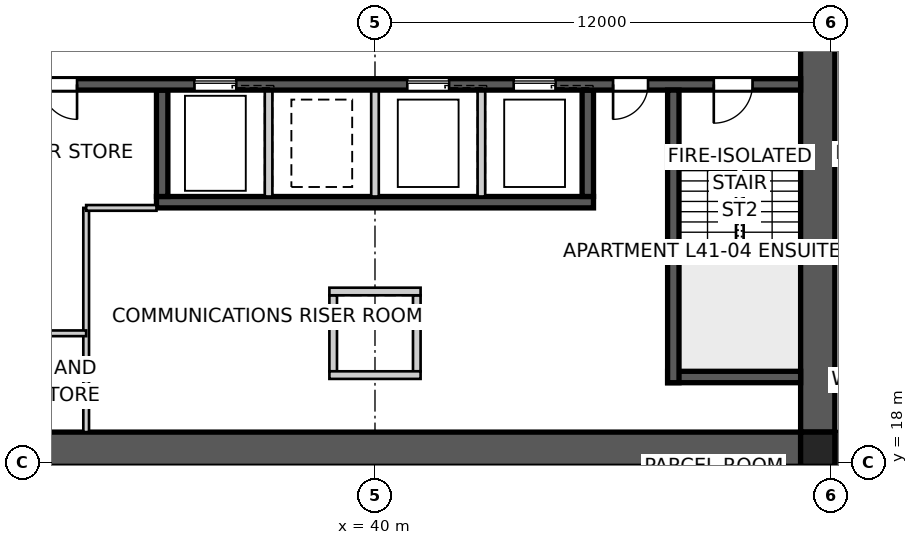
"""IFC4 building model, lengths in metres.
Left out: names, types, materials, properties, quantities, classifications, styles, units other than length and angle.
Written with IfcOpenShell. Run it as: python <this file> out.ifc"""

import sys

from ifc_helpers import new_model, si_unit, direction, frame, frame_2d, origin, origin_2d, place, context, subcontext, project, spatial, polyline, rectangle, outline, extrude, element, fill, save


model = new_model("IFC4")
c1 = context("Model", 3, precision=1e-05, world=origin(), true_north=direction((0.0, 1.0)))
c2 = subcontext(c1, "Body", "Model", "MODEL_VIEW")
j1 = project(units=[si_unit("LENGTHUNIT", "METRE"), si_unit("PLANEANGLEUNIT", "RADIAN")], contexts=[c1])
p1 = place(None, origin())
s1 = spatial("IfcSite", under=j1, at=p1, CompositionType="ELEMENT")
p2 = place(p1, origin())
s2 = spatial("IfcBuilding", under=s1, at=p2, CompositionType="ELEMENT")
p3 = place(p2, frame((0.0, 0.0, 150.6)))
s3 = spatial("IfcBuildingStorey", under=s2, at=p3, CompositionType="ELEMENT", Elevation=150.6)
p4 = place(p3, frame((51.2, 18.35, 0.0), z_axis=(0.0, 0.0, 1.0), x_axis=(-1.0, 0.0, 0.0)))
e1 = element("IfcWall", 1, at=p4, inside=s3, PredefinedType="SHEAR", context=c2, shape_type="SweptSolid", body=[
    extrude(outline(polyline([(0.0, -0.45), (22.4, -0.45), (22.4, -0.025), (22.85, -0.025), (22.85, 0.025), (22.4, 0.025), (22.4, 0.45), (0.0, 0.45), (0.0, 0.025), (-0.45, 0.025), (-0.45, -0.025), (0.0, -0.025), (0.0, -0.45)])), origin(), (0.0, 0.0, 1.0), 3.4),
])
p5 = place(p3, frame((51.65, 18.8, 0.0), z_axis=(0.0, 0.0, 1.0), x_axis=(0.0, 1.0, 0.0)))
e2 = element("IfcWall", 2, at=p5, inside=s3, PredefinedType="SHEAR", context=c2, shape_type="SweptSolid", body=[
    extrude(outline(polyline([(0.0, -0.45), (22.4, -0.45), (22.4, -0.025), (22.85, -0.025), (22.85, 0.025), (22.4, 0.025), (22.4, 0.45), (0.0, 0.45), (0.0, 0.025), (-0.45, 0.025), (-0.45, -0.025), (0.0, -0.025), (0.0, -0.45)])), origin(), (0.0, 0.0, 1.0), 3.4),
])
p6 = place(p5, frame((11.14, 0.0, 0.0)))
e3 = element("IfcOpeningElement", 3, at=p6, cuts=e2, PredefinedType="OPENING", context=c2, shape_type="SweptSolid", body=[
    extrude(rectangle(XDim=1.02, YDim=2.4, at=frame_2d((0.51, 1.2))), frame((0.0, 0.46, 0.0), z_axis=(0.0, -1.0, 0.0), x_axis=(1.0, 0.0, 0.0)), (0.0, 0.0, 1.0), 0.92),
])
p7 = place(p3, frame((51.2, 27.95, 0.0), z_axis=(0.0, 0.0, 1.0), x_axis=(-1.0, 0.0, 0.0)))
e4 = element("IfcWall", 4, at=p7, inside=s3, PredefinedType="SHEAR", context=c2, shape_type="SweptSolid", body=[
    extrude(rectangle(XDim=22.4, YDim=0.3, at=frame_2d((11.2, 0.0))), origin(), (0.0, 0.0, 1.0), 3.4),
])
p8 = place(p7, frame((19.04, 0.0, 0.0)))
e5 = element("IfcOpeningElement", 5, at=p8, cuts=e4, PredefinedType="OPENING", context=c2, shape_type="SweptSolid", body=[
    extrude(rectangle(XDim=0.92, YDim=2.1, at=frame_2d((0.46, 1.05))), frame((0.0, 0.16, 0.0), z_axis=(0.0, -1.0, 0.0), x_axis=(1.0, 0.0, 0.0)), (0.0, 0.0, 1.0), 0.32),
])
p9 = place(p7, frame((1.265, 0.0, 0.0)))
e6 = element("IfcOpeningElement", 6, at=p9, cuts=e4, PredefinedType="OPENING", context=c2, shape_type="SweptSolid", body=[
    extrude(rectangle(XDim=1.02, YDim=2.1, at=frame_2d((0.51, 1.05))), frame((0.0, 0.16, 0.0), z_axis=(0.0, -1.0, 0.0), x_axis=(1.0, 0.0, 0.0)), (0.0, 0.0, 1.0), 0.32),
])
p10 = place(p7, frame((4.015, 0.0, 0.0)))
e7 = element("IfcOpeningElement", 7, at=p10, cuts=e4, PredefinedType="OPENING", context=c2, shape_type="SweptSolid", body=[
    extrude(rectangle(XDim=0.92, YDim=2.1, at=frame_2d((0.46, 1.05))), frame((0.0, 0.16, 0.0), z_axis=(0.0, -1.0, 0.0), x_axis=(1.0, 0.0, 0.0)), (0.0, 0.0, 1.0), 0.32),
])
p11 = place(p7, frame((6.45, 0.0, 0.0)))
e8 = element("IfcOpeningElement", 8, at=p11, cuts=e4, PredefinedType="OPENING", context=c2, shape_type="SweptSolid", body=[
    extrude(rectangle(XDim=1.1, YDim=2.1, at=frame_2d((0.55, 1.05))), frame((0.0, 0.16, 0.0), z_axis=(0.0, -1.0, 0.0), x_axis=(1.0, 0.0, 0.0)), (0.0, 0.0, 1.0), 0.32),
])
p12 = place(p7, frame((9.25, 0.0, 0.0)))
e9 = element("IfcOpeningElement", 9, at=p12, cuts=e4, PredefinedType="OPENING", context=c2, shape_type="SweptSolid", body=[
    extrude(rectangle(XDim=1.1, YDim=2.1, at=frame_2d((0.55, 1.05))), frame((0.0, 0.16, 0.0), z_axis=(0.0, -1.0, 0.0), x_axis=(1.0, 0.0, 0.0)), (0.0, 0.0, 1.0), 0.32),
])
p13 = place(p7, frame((14.85, 0.0, 0.0)))
e10 = element("IfcOpeningElement", 10, at=p13, cuts=e4, PredefinedType="OPENING", context=c2, shape_type="SweptSolid", body=[
    extrude(rectangle(XDim=1.1, YDim=2.1, at=frame_2d((0.55, 1.05))), frame((0.0, 0.16, 0.0), z_axis=(0.0, -1.0, 0.0), x_axis=(1.0, 0.0, 0.0)), (0.0, 0.0, 1.0), 0.32),
])
p14 = place(p3, frame((45.75, 24.85, 0.0), z_axis=(0.0, 0.0, 1.0), x_axis=(-1.0, 0.0, 0.0)))
e11 = element("IfcWall", 11, at=p14, inside=s3, PredefinedType="SHEAR", context=c2, shape_type="SweptSolid", body=[
    extrude(rectangle(XDim=11.5, YDim=0.3, at=frame_2d((5.75, 0.0))), origin(), (0.0, 0.0, 1.0), 3.4),
])
p15 = place(p3, frame((45.6, 27.8, 0.0), z_axis=(0.0, 0.0, 1.0), x_axis=(0.0, -1.0, 0.0)))
e12 = element("IfcWall", 12, at=p15, inside=s3, PredefinedType="SHEAR", context=c2, shape_type="SweptSolid", body=[
    extrude(rectangle(XDim=2.8, YDim=0.3, at=frame_2d((1.4, 0.0))), origin(), (0.0, 0.0, 1.0), 3.4),
])
for number, where, z_axis, x_axis in (
    (13, (42.8, 27.8, 0.0), (0.0, 0.0, 1.0), (0.0, -1.0, 0.0)),
    (14, (40.0, 27.8, 0.0), (0.0, 0.0, 1.0), (0.0, -1.0, 0.0)),
    (15, (37.2, 27.8, 0.0), (0.0, 0.0, 1.0), (0.0, -1.0, 0.0)),
):
    element("IfcWall", number, at=place(p3, frame(where, z_axis=z_axis, x_axis=x_axis)), inside=s3, PredefinedType="SOLIDWALL", context=c2, shape_type="SweptSolid", body=[
        extrude(rectangle(XDim=2.8, YDim=0.2, at=frame_2d((1.4, 0.0))), origin(), (0.0, 0.0, 1.0), 3.4),
    ])
p16 = place(p3, frame((34.4, 27.8, 0.0), z_axis=(0.0, 0.0, 1.0), x_axis=(0.0, -1.0, 0.0)))
e16 = element("IfcWall", 16, at=p16, inside=s3, PredefinedType="SHEAR", context=c2, shape_type="SweptSolid", body=[
    extrude(rectangle(XDim=2.8, YDim=0.3, at=frame_2d((1.4, 0.0))), origin(), (0.0, 0.0, 1.0), 3.4),
])
p17 = place(p3, frame((47.85, 27.8, 0.0), z_axis=(0.0, 0.0, 1.0), x_axis=(0.0, -1.0, 0.0)))
e17 = element("IfcWall", 17, at=p17, inside=s3, PredefinedType="SHEAR", context=c2, shape_type="SweptSolid", body=[
    extrude(rectangle(XDim=7.7, YDim=0.3, at=frame_2d((3.85, 0.0))), origin(), (0.0, 0.0, 1.0), 3.4),
])
p18 = place(p3, frame((51.2, 20.25, 0.0), z_axis=(0.0, 0.0, 1.0), x_axis=(-1.0, 0.0, 0.0)))
e18 = element("IfcWall", 18, at=p18, inside=s3, PredefinedType="SHEAR", context=c2, shape_type="SweptSolid", body=[
    extrude(rectangle(XDim=3.5, YDim=0.3, at=frame_2d((1.75, 0.0))), origin(), (0.0, 0.0, 1.0), 3.4),
])
for number, where, z_axis, x_axis in (
    (19, (38.9, 22.4, 0.0), (0.0, 0.0, 1.0), (0.0, -1.0, 0.0)),
    (20, (41.1, 22.4, 0.0), (0.0, 0.0, 1.0), (0.0, -1.0, 0.0)),
):
    element("IfcWall", number, at=place(p3, frame(where, z_axis=z_axis, x_axis=x_axis)), inside=s3, PredefinedType="SOLIDWALL", context=c2, shape_type="SweptSolid", body=[
        extrude(rectangle(XDim=2.0, YDim=0.2, at=frame_2d((1.0, 0.0))), origin(), (0.0, 0.0, 1.0), 3.4),
    ])
for number, where, z_axis, x_axis in (
    (21, (38.8, 22.5, 0.0), (0.0, 0.0, 1.0), (1.0, 0.0, 0.0)),
    (22, (38.8, 20.3, 0.0), (0.0, 0.0, 1.0), (1.0, 0.0, 0.0)),
):
    element("IfcWall", number, at=place(p3, frame(where, z_axis=z_axis, x_axis=x_axis)), inside=s3, PredefinedType="SOLIDWALL", context=c2, shape_type="SweptSolid", body=[
        extrude(rectangle(XDim=2.4, YDim=0.2, at=frame_2d((1.2, 0.0))), origin(), (0.0, 0.0, 1.0), 3.4),
    ])
p19 = place(p3, frame((51.65, 18.35, 0.0), z_axis=(0.0, 0.0, 1.0), x_axis=(1.0, 0.0, 0.0)))
e23 = element("IfcColumn", 23, at=p19, inside=s3, PredefinedType="COLUMN", context=c2, shape_type="SweptSolid", body=[
    extrude(rectangle(XDim=0.9, YDim=0.9, at=origin_2d()), origin(), (0.0, 0.0, 1.0), 3.4),
])
p20 = place(p3, frame((32.4, 18.8, 0.0), z_axis=(0.0, 0.0, 1.0), x_axis=(0.0, 1.0, 0.0)))
e24 = element("IfcWall", 24, at=p20, inside=s3, PredefinedType="SOLIDWALL", context=c2, shape_type="SweptSolid", body=[
    extrude(rectangle(XDim=5.9, YDim=0.15, at=frame_2d((2.95, 0.0))), origin(), (0.0, 0.0, 1.0), 3.25),
])
p21 = place(p3, frame((32.4, 24.7, 0.0), z_axis=(0.0, 0.0, 1.0), x_axis=(1.0, 0.0, 0.0)))
e25 = element("IfcWall", 25, at=p21, inside=s3, PredefinedType="SOLIDWALL", context=c2, shape_type="SweptSolid", body=[
    extrude(rectangle(XDim=1.85, YDim=0.15, at=frame_2d((0.925, 0.0))), origin(), (0.0, 0.0, 1.0), 3.25),
])
p22 = place(p3, frame((32.4, 21.4, 0.0), z_axis=(0.0, 0.0, 1.0), x_axis=(-1.0, 0.0, 0.0)))
e26 = element("IfcWall", 26, at=p22, inside=s3, PredefinedType="SOLIDWALL", context=c2, shape_type="SweptSolid", body=[
    extrude(rectangle(XDim=3.6, YDim=0.15, at=frame_2d((1.8, 0.0))), origin(), (0.0, 0.0, 1.0), 3.25),
])
p23 = place(p22, frame((1.34, 0.0, 0.0)))
e27 = element("IfcOpeningElement", 27, at=p23, cuts=e26, PredefinedType="OPENING", context=c2, shape_type="SweptSolid", body=[
    extrude(rectangle(XDim=0.92, YDim=2.1, at=frame_2d((0.46, 1.05))), frame((0.0, 0.085, 0.0), z_axis=(0.0, -1.0, 0.0), x_axis=(1.0, 0.0, 0.0)), (0.0, 0.0, 1.0), 0.17),
])
p24 = place(p3, frame((52.1, 15.65, 0.0), z_axis=(0.0, 0.0, 1.0), x_axis=(0.0, 1.0, 0.0)))
e28 = element("IfcWall", 28, at=p24, inside=s3, PredefinedType="PARTITIONING", context=c2, shape_type="SweptSolid", body=[
    extrude(rectangle(XDim=3.17, YDim=0.2, at=frame_2d((1.585, 0.0))), origin(), (0.0, 0.0, 1.0), 3.25),
])
p25 = place(p8, origin())
e29 = element("IfcDoor", 29, at=p25, inside=s3, OperationType="SINGLE_SWING_LEFT", PredefinedType="DOOR", context=c2, shape_type="SweptSolid", body=[
    extrude(rectangle(XDim=0.92, YDim=2.1, at=frame_2d((0.46, 1.05))), frame((0.0, 0.025, 0.0), z_axis=(0.0, -1.0, 0.0), x_axis=(1.0, 0.0, 0.0)), (0.0, 0.0, 1.0), 0.05),
])
fill(e5, e29)
p26 = place(p9, origin())
e30 = element("IfcDoor", 30, at=p26, inside=s3, OperationType="SINGLE_SWING_RIGHT", PredefinedType="DOOR", context=c2, shape_type="SweptSolid", body=[
    extrude(rectangle(XDim=1.02, YDim=2.1, at=frame_2d((0.51, 1.05))), frame((0.0, 0.025, 0.0), z_axis=(0.0, -1.0, 0.0), x_axis=(1.0, 0.0, 0.0)), (0.0, 0.0, 1.0), 0.05),
])
fill(e6, e30)
p27 = place(p10, origin())
e31 = element("IfcDoor", 31, at=p27, inside=s3, OperationType="SINGLE_SWING_RIGHT", PredefinedType="DOOR", context=c2, shape_type="SweptSolid", body=[
    extrude(rectangle(XDim=0.92, YDim=2.1, at=frame_2d((0.46, 1.05))), frame((0.0, 0.025, 0.0), z_axis=(0.0, -1.0, 0.0), x_axis=(1.0, 0.0, 0.0)), (0.0, 0.0, 1.0), 0.05),
])
fill(e7, e31)
p28 = place(p11, origin())
e32 = element("IfcDoor", 32, at=p28, inside=s3, OperationType="SLIDING_TO_LEFT", PredefinedType="DOOR", context=c2, shape_type="SweptSolid", body=[
    extrude(rectangle(XDim=1.1, YDim=2.1, at=frame_2d((0.55, 1.05))), frame((0.0, 0.025, 0.0), z_axis=(0.0, -1.0, 0.0), x_axis=(1.0, 0.0, 0.0)), (0.0, 0.0, 1.0), 0.05),
])
fill(e8, e32)
p29 = place(p12, origin())
e33 = element("IfcDoor", 33, at=p29, inside=s3, OperationType="SLIDING_TO_LEFT", PredefinedType="DOOR", context=c2, shape_type="SweptSolid", body=[
    extrude(rectangle(XDim=1.1, YDim=2.1, at=frame_2d((0.55, 1.05))), frame((0.0, 0.025, 0.0), z_axis=(0.0, -1.0, 0.0), x_axis=(1.0, 0.0, 0.0)), (0.0, 0.0, 1.0), 0.05),
])
fill(e9, e33)
p30 = place(p13, origin())
e34 = element("IfcDoor", 34, at=p30, inside=s3, OperationType="SLIDING_TO_LEFT", PredefinedType="DOOR", context=c2, shape_type="SweptSolid", body=[
    extrude(rectangle(XDim=1.1, YDim=2.1, at=frame_2d((0.55, 1.05))), frame((0.0, 0.025, 0.0), z_axis=(0.0, -1.0, 0.0), x_axis=(1.0, 0.0, 0.0)), (0.0, 0.0, 1.0), 0.05),
])
fill(e10, e34)
save(model, sys.argv[1])
